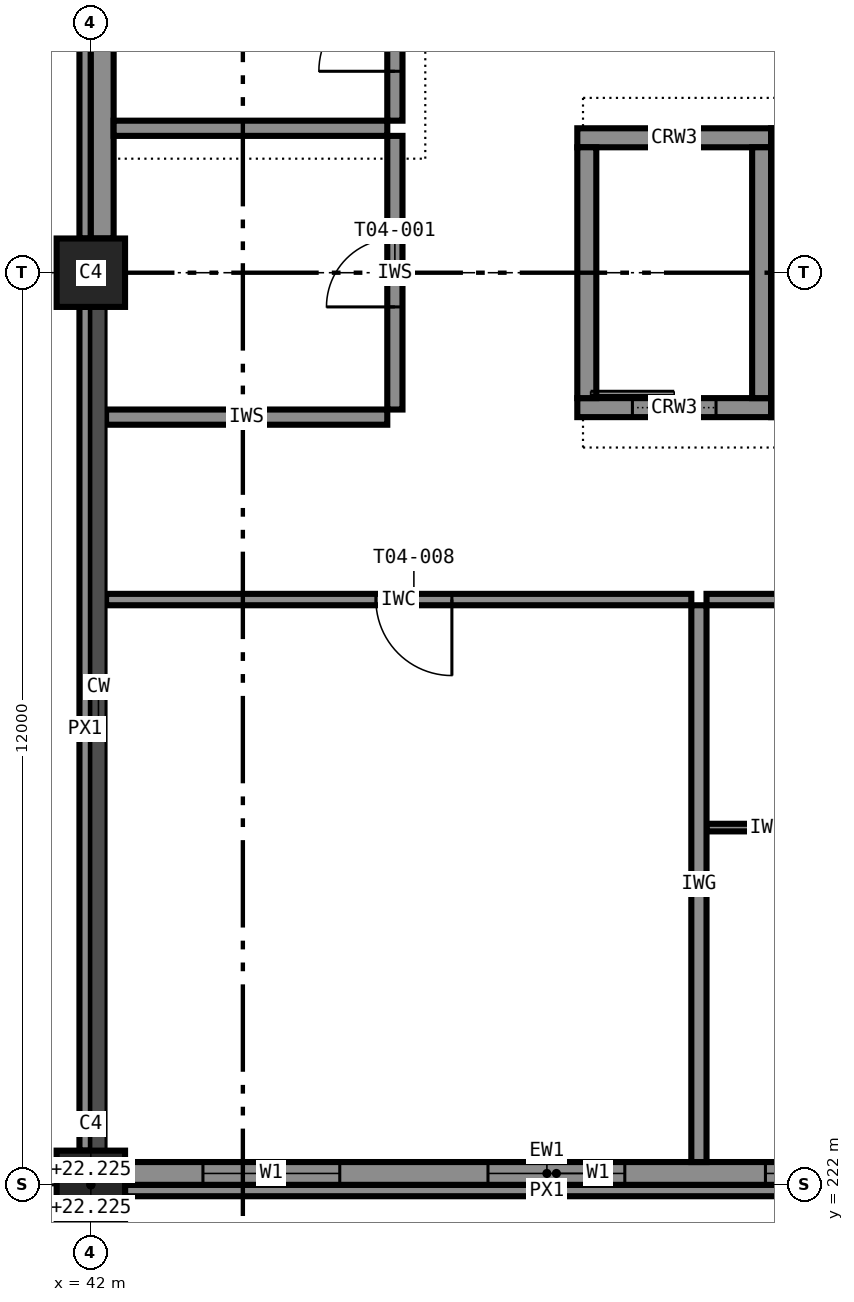
"""IFC4 building model, lengths in metres.
Left out: names, types, materials, properties, quantities, classifications, styles, units other than length and angle.
Written with IfcOpenShell. Run it as: python <this file> out.ifc"""

import sys

from ifc_helpers import new_model, si_unit, direction, frame, frame_2d, origin, origin_2d, place, context, subcontext, project, spatial, rectangle, extrude, element, fill, save


model = new_model("IFC4")
c1 = context("Model", 3, precision=1e-05, world=origin(), true_north=direction((0.0, 1.0)))
c2 = subcontext(c1, "Body", "Model", "MODEL_VIEW")
j1 = project(units=[si_unit("LENGTHUNIT", "METRE"), si_unit("PLANEANGLEUNIT", "RADIAN")], contexts=[c1])
p1 = place(None, origin())
s1 = spatial("IfcSite", under=j1, at=p1, CompositionType="ELEMENT")
p2 = place(p1, origin())
s2 = spatial("IfcBuilding", under=s1, at=p2, CompositionType="ELEMENT")
p3 = place(p2, frame((0.0, 0.0, 21.0)))
s3 = spatial("IfcBuildingStorey", under=s2, at=p3, CompositionType="ELEMENT", Elevation=21.0)
for number, where, z_axis, x_axis in (
    (1, (42.0, 222.0, 0.0), (0.0, 0.0, 1.0), (1.0, 0.0, 0.0)),
    (2, (42.0, 234.0, 0.0), (0.0, 0.0, 1.0), (1.0, 0.0, 0.0)),
):
    element("IfcColumn", number, at=place(p3, frame(where, z_axis=z_axis, x_axis=x_axis)), inside=s3, PredefinedType="COLUMN", context=c2, shape_type="SweptSolid", body=[
        extrude(rectangle(XDim=0.9, YDim=0.9, at=origin_2d()), origin(), (0.0, 0.0, 1.0), 3.6),
    ])
p4 = place(p3, frame((48.4, 232.225, 0.0), z_axis=(0.0, 0.0, 1.0), x_axis=(1.0, 0.0, 0.0)))
e3 = element("IfcWall", 3, at=p4, inside=s3, PredefinedType="SHEAR", context=c2, shape_type="SweptSolid", body=[
    extrude(rectangle(XDim=2.55, YDim=0.25, at=frame_2d((1.275, 0.0))), origin(), (0.0, 0.0, 1.0), 3.6),
])
p5 = place(p4, frame((0.725, 0.0, 0.0)))
e4 = element("IfcOpeningElement", 4, at=p5, cuts=e3, PredefinedType="OPENING", context=c2, shape_type="SweptSolid", body=[
    extrude(rectangle(XDim=1.1, YDim=2.1, at=frame_2d((0.55, 1.05))), frame((0.0, 0.135, 0.0), z_axis=(0.0, -1.0, 0.0), x_axis=(1.0, 0.0, 0.0)), (0.0, 0.0, 1.0), 0.27),
])
p6 = place(p3, frame((48.4, 235.775, 0.0), z_axis=(0.0, 0.0, 1.0), x_axis=(1.0, 0.0, 0.0)))
e5 = element("IfcWall", 5, at=p6, inside=s3, PredefinedType="SHEAR", context=c2, shape_type="SweptSolid", body=[
    extrude(rectangle(XDim=2.55, YDim=0.25, at=frame_2d((1.275, 0.0))), origin(), (0.0, 0.0, 1.0), 3.6),
])
for number, where, z_axis, x_axis in (
    (6, (48.525, 232.35, 0.0), (0.0, 0.0, 1.0), (0.0, 1.0, 0.0)),
    (7, (50.825, 232.35, 0.0), (0.0, 0.0, 1.0), (0.0, 1.0, 0.0)),
):
    element("IfcWall", number, at=place(p3, frame(where, z_axis=z_axis, x_axis=x_axis)), inside=s3, PredefinedType="SHEAR", context=c2, shape_type="SweptSolid", body=[
        extrude(rectangle(XDim=3.3, YDim=0.25, at=frame_2d((1.65, 0.0))), origin(), (0.0, 0.0, 1.0), 3.6),
    ])
p7 = place(p3, frame((50.95, 232.225, 0.0), z_axis=(0.0, 0.0, 1.0), x_axis=(1.0, 0.0, 0.0)))
e8 = element("IfcWall", 8, at=p7, inside=s3, PredefinedType="SHEAR", context=c2, shape_type="SweptSolid", body=[
    extrude(rectangle(XDim=2.55, YDim=0.25, at=frame_2d((1.275, 0.0))), origin(), (0.0, 0.0, 1.0), 3.6),
])
p8 = place(p7, frame((0.725, 0.0, 0.0)))
e9 = element("IfcOpeningElement", 9, at=p8, cuts=e8, PredefinedType="OPENING", context=c2, shape_type="SweptSolid", body=[
    extrude(rectangle(XDim=1.1, YDim=2.1, at=frame_2d((0.55, 1.05))), frame((0.0, 0.135, 0.0), z_axis=(0.0, -1.0, 0.0), x_axis=(1.0, 0.0, 0.0)), (0.0, 0.0, 1.0), 0.27),
])
p9 = place(p3, frame((50.95, 235.775, 0.0), z_axis=(0.0, 0.0, 1.0), x_axis=(1.0, 0.0, 0.0)))
e10 = element("IfcWall", 10, at=p9, inside=s3, PredefinedType="SHEAR", context=c2, shape_type="SweptSolid", body=[
    extrude(rectangle(XDim=2.55, YDim=0.25, at=frame_2d((1.275, 0.0))), origin(), (0.0, 0.0, 1.0), 3.6),
])
p10 = place(p3, frame((51.075, 232.35, 0.0), z_axis=(0.0, 0.0, 1.0), x_axis=(0.0, 1.0, 0.0)))
e11 = element("IfcWall", 11, at=p10, inside=s3, PredefinedType="SHEAR", context=c2, shape_type="SweptSolid", body=[
    extrude(rectangle(XDim=3.3, YDim=0.25, at=frame_2d((1.65, 0.0))), origin(), (0.0, 0.0, 1.0), 3.6),
])
p11 = place(p3, frame((42.45, 222.15, 0.0), z_axis=(0.0, 0.0, 1.0), x_axis=(1.0, 0.0, 0.0)))
e12 = element("IfcWall", 12, at=p11, inside=s3, PredefinedType="STANDARD", context=c2, shape_type="SweptSolid", body=[
    extrude(rectangle(XDim=11.1, YDim=0.3, at=frame_2d((5.55, 0.0))), origin(), (0.0, 0.0, 1.0), 2.6),
])
p12 = place(p11, frame((1.025, 0.0, 0.85)))
e13 = element("IfcOpeningElement", 13, at=p12, cuts=e12, PredefinedType="OPENING", context=c2, shape_type="SweptSolid", body=[
    extrude(rectangle(XDim=1.8, YDim=1.75, at=frame_2d((0.9, 0.875))), frame((0.0, 0.16, 0.0), z_axis=(0.0, -1.0, 0.0), x_axis=(1.0, 0.0, 0.0)), (0.0, 0.0, 1.0), 0.32),
])
p13 = place(p11, frame((4.775, 0.0, 0.85)))
e14 = element("IfcOpeningElement", 14, at=p13, cuts=e12, PredefinedType="OPENING", context=c2, shape_type="SweptSolid", body=[
    extrude(rectangle(XDim=1.8, YDim=1.75, at=frame_2d((0.9, 0.875))), frame((0.0, 0.16, 0.0), z_axis=(0.0, -1.0, 0.0), x_axis=(1.0, 0.0, 0.0)), (0.0, 0.0, 1.0), 0.32),
])
p14 = place(p11, frame((8.425, 0.0, 0.85)))
e15 = element("IfcOpeningElement", 15, at=p14, cuts=e12, PredefinedType="OPENING", context=c2, shape_type="SweptSolid", body=[
    extrude(rectangle(XDim=1.8, YDim=1.75, at=frame_2d((0.9, 0.875))), frame((0.0, 0.16, 0.0), z_axis=(0.0, -1.0, 0.0), x_axis=(1.0, 0.0, 0.0)), (0.0, 0.0, 1.0), 0.32),
])
p15 = place(p3, frame((42.45, 221.925, 3.4), z_axis=(0.0, 0.0, 1.0), x_axis=(1.0, 0.0, 0.0)))
e16 = element("IfcWall", 16, at=p15, inside=s3, PredefinedType="STANDARD", context=c2, shape_type="SweptSolid", body=[
    extrude(rectangle(XDim=11.1, YDim=0.15, at=frame_2d((5.55, 0.0))), origin(), (0.0, 0.0, 1.0), 0.2),
])
p16 = place(p3, frame((42.15, 245.55, 0.0), z_axis=(0.0, 0.0, 1.0), x_axis=(0.0, -1.0, 0.0)))
e17 = element("IfcWall", 17, at=p16, inside=s3, PredefinedType="STANDARD", context=c2, shape_type="SweptSolid", body=[
    extrude(rectangle(XDim=11.1, YDim=0.3, at=frame_2d((5.55, 0.0))), origin(), (0.0, 0.0, 1.0), 2.6),
])
for number, where, z_axis, x_axis in (
    (18, (41.925, 245.55, 3.4), (0.0, 0.0, 1.0), (0.0, -1.0, 0.0)),
    (19, (41.925, 233.55, 3.4), (0.0, 0.0, 1.0), (0.0, -1.0, 0.0)),
):
    element("IfcWall", number, at=place(p3, frame(where, z_axis=z_axis, x_axis=x_axis)), inside=s3, PredefinedType="STANDARD", context=c2, shape_type="SweptSolid", body=[
        extrude(rectangle(XDim=11.1, YDim=0.15, at=frame_2d((5.55, 0.0))), origin(), (0.0, 0.0, 1.0), 0.2),
    ])
p17 = place(p3, frame((42.2, 232.1, 0.0), z_axis=(0.0, 0.0, 1.0), x_axis=(1.0, 0.0, 0.0)))
e20 = element("IfcWall", 20, at=p17, inside=s3, PredefinedType="PARTITIONING", context=c2, shape_type="SweptSolid", body=[
    extrude(rectangle(XDim=3.7, YDim=0.2, at=frame_2d((1.85, 0.0))), origin(), (0.0, 0.0, 1.0), 3.4),
])
p18 = place(p3, frame((42.3, 235.9, 0.0), z_axis=(0.0, 0.0, 1.0), x_axis=(1.0, 0.0, 0.0)))
e21 = element("IfcWall", 21, at=p18, inside=s3, PredefinedType="PARTITIONING", context=c2, shape_type="SweptSolid", body=[
    extrude(rectangle(XDim=3.6, YDim=0.2, at=frame_2d((1.8, 0.0))), origin(), (0.0, 0.0, 1.0), 3.4),
])
p19 = place(p3, frame((46.0, 232.2, 0.0), z_axis=(0.0, 0.0, 1.0), x_axis=(0.0, 1.0, 0.0)))
e22 = element("IfcWall", 22, at=p19, inside=s3, PredefinedType="PARTITIONING", context=c2, shape_type="SweptSolid", body=[
    extrude(rectangle(XDim=3.6, YDim=0.2, at=frame_2d((1.8, 0.0))), origin(), (0.0, 0.0, 1.0), 3.4),
])
p20 = place(p19, frame((1.35, 0.0, 0.0)))
e23 = element("IfcOpeningElement", 23, at=p20, cuts=e22, PredefinedType="OPENING", context=c2, shape_type="SweptSolid", body=[
    extrude(rectangle(XDim=0.9, YDim=2.1, at=frame_2d((0.45, 1.05))), frame((0.0, 0.11, 0.0), z_axis=(0.0, -1.0, 0.0), x_axis=(1.0, 0.0, 0.0)), (0.0, 0.0, 1.0), 0.22),
])
p21 = place(p3, frame((46.0, 236.0, 0.0), z_axis=(0.0, 0.0, 1.0), x_axis=(0.0, 1.0, 0.0)))
e24 = element("IfcWall", 24, at=p21, inside=s3, PredefinedType="PARTITIONING", context=c2, shape_type="SweptSolid", body=[
    extrude(rectangle(XDim=2.3, YDim=0.2, at=frame_2d((1.15, 0.0))), origin(), (0.0, 0.0, 1.0), 3.4),
])
p22 = place(p21, frame((0.65, 0.0, 0.0)))
e25 = element("IfcOpeningElement", 25, at=p22, cuts=e24, PredefinedType="OPENING", context=c2, shape_type="SweptSolid", body=[
    extrude(rectangle(XDim=1.0, YDim=2.1, at=frame_2d((0.5, 1.05))), frame((0.0, 0.11, 0.0), z_axis=(0.0, -1.0, 0.0), x_axis=(1.0, 0.0, 0.0)), (0.0, 0.0, 1.0), 0.22),
])
p23 = place(p3, frame((49.9, 229.7, 0.0), z_axis=(0.0, 0.0, 1.0), x_axis=(-1.0, 0.0, 0.0)))
e26 = element("IfcWall", 26, at=p23, inside=s3, PredefinedType="PARTITIONING", context=c2, shape_type="SweptSolid", body=[
    extrude(rectangle(XDim=7.7, YDim=0.15, at=frame_2d((3.85, 0.0))), origin(), (0.0, 0.0, 1.0), 3.4),
])
p24 = place(p23, frame((3.15, 0.0, 0.0)))
e27 = element("IfcOpeningElement", 27, at=p24, cuts=e26, PredefinedType="OPENING", context=c2, shape_type="SweptSolid", body=[
    extrude(rectangle(XDim=1.0, YDim=2.1, at=frame_2d((0.5, 1.05))), frame((0.0, 0.085, 0.0), z_axis=(0.0, -1.0, 0.0), x_axis=(1.0, 0.0, 0.0)), (0.0, 0.0, 1.0), 0.17),
])
p25 = place(p3, frame((53.9, 229.7, 0.0), z_axis=(0.0, 0.0, 1.0), x_axis=(-1.0, 0.0, 0.0)))
e28 = element("IfcWall", 28, at=p25, inside=s3, PredefinedType="PARTITIONING", context=c2, shape_type="SweptSolid", body=[
    extrude(rectangle(XDim=3.8, YDim=0.15, at=frame_2d((1.9, 0.0))), origin(), (0.0, 0.0, 1.0), 3.4),
])
p26 = place(p25, frame((0.55, 0.0, 0.0)))
e29 = element("IfcOpeningElement", 29, at=p26, cuts=e28, PredefinedType="OPENING", context=c2, shape_type="SweptSolid", body=[
    extrude(rectangle(XDim=1.0, YDim=2.1, at=frame_2d((0.5, 1.05))), frame((0.0, 0.085, 0.0), z_axis=(0.0, -1.0, 0.0), x_axis=(1.0, 0.0, 0.0)), (0.0, 0.0, 1.0), 0.17),
])
p27 = place(p3, frame((50.1, 226.7, 0.0), z_axis=(0.0, 0.0, 1.0), x_axis=(1.0, 0.0, 0.0)))
e30 = element("IfcWall", 30, at=p27, inside=s3, PredefinedType="PARTITIONING", context=c2, shape_type="SweptSolid", body=[
    extrude(rectangle(XDim=1.6, YDim=0.1, at=frame_2d((0.8, 0.0))), origin(), (0.0, 0.0, 1.0), 3.4),
])
p28 = place(p3, frame((50.0, 222.3, 0.0), z_axis=(0.0, 0.0, 1.0), x_axis=(0.0, 1.0, 0.0)))
e31 = element("IfcWall", 31, at=p28, inside=s3, PredefinedType="PARTITIONING", context=c2, shape_type="SweptSolid", body=[
    extrude(rectangle(XDim=7.325, YDim=0.2, at=frame_2d((3.663, 0.0))), origin(), (0.0, 0.0, 1.0), 3.4),
])
p29 = place(p12, origin())
e32 = element("IfcWindow", 32, at=p29, inside=s3, PartitioningType="SINGLE_PANEL", PredefinedType="WINDOW", context=c2, shape_type="SweptSolid", body=[
    extrude(rectangle(XDim=1.8, YDim=1.75, at=frame_2d((0.9, 0.875))), frame((0.0, 0.03, 0.0), z_axis=(0.0, -1.0, 0.0), x_axis=(1.0, 0.0, 0.0)), (0.0, 0.0, 1.0), 0.06),
])
fill(e13, e32)
p30 = place(p13, origin())
e33 = element("IfcWindow", 33, at=p30, inside=s3, PartitioningType="SINGLE_PANEL", PredefinedType="WINDOW", context=c2, shape_type="SweptSolid", body=[
    extrude(rectangle(XDim=1.8, YDim=1.75, at=frame_2d((0.9, 0.875))), frame((0.0, 0.03, 0.0), z_axis=(0.0, -1.0, 0.0), x_axis=(1.0, 0.0, 0.0)), (0.0, 0.0, 1.0), 0.06),
])
fill(e14, e33)
p31 = place(p14, origin())
e34 = element("IfcWindow", 34, at=p31, inside=s3, PartitioningType="SINGLE_PANEL", PredefinedType="WINDOW", context=c2, shape_type="SweptSolid", body=[
    extrude(rectangle(XDim=1.8, YDim=1.75, at=frame_2d((0.9, 0.875))), frame((0.0, 0.03, 0.0), z_axis=(0.0, -1.0, 0.0), x_axis=(1.0, 0.0, 0.0)), (0.0, 0.0, 1.0), 0.06),
])
fill(e15, e34)
p32 = place(p20, origin())
e35 = element("IfcDoor", 35, at=p32, inside=s3, OperationType="SINGLE_SWING_LEFT", PredefinedType="DOOR", context=c2, shape_type="SweptSolid", body=[
    extrude(rectangle(XDim=0.9, YDim=2.1, at=frame_2d((0.45, 1.05))), frame((0.0, 0.025, 0.0), z_axis=(0.0, -1.0, 0.0), x_axis=(1.0, 0.0, 0.0)), (0.0, 0.0, 1.0), 0.05),
])
fill(e23, e35)
p33 = place(p22, origin())
e36 = element("IfcDoor", 36, at=p33, inside=s3, OperationType="SINGLE_SWING_LEFT", PredefinedType="DOOR", context=c2, shape_type="SweptSolid", body=[
    extrude(rectangle(XDim=1.0, YDim=2.1, at=frame_2d((0.5, 1.05))), frame((0.0, 0.025, 0.0), z_axis=(0.0, -1.0, 0.0), x_axis=(1.0, 0.0, 0.0)), (0.0, 0.0, 1.0), 0.05),
])
fill(e25, e36)
p34 = place(p24, origin())
e37 = element("IfcDoor", 37, at=p34, inside=s3, OperationType="SINGLE_SWING_LEFT", PredefinedType="DOOR", context=c2, shape_type="SweptSolid", body=[
    extrude(rectangle(XDim=1.0, YDim=2.1, at=frame_2d((0.5, 1.05))), frame((0.0, 0.025, 0.0), z_axis=(0.0, -1.0, 0.0), x_axis=(1.0, 0.0, 0.0)), (0.0, 0.0, 1.0), 0.05),
])
fill(e27, e37)
p35 = place(p5, origin())
e38 = element("IfcDoor", 38, at=p35, inside=s3, OperationType="SLIDING_TO_LEFT", PredefinedType="DOOR", context=c2, shape_type="SweptSolid", body=[
    extrude(rectangle(XDim=1.1, YDim=2.1, at=frame_2d((0.55, 1.05))), frame((0.0, 0.025, 0.0), z_axis=(0.0, -1.0, 0.0), x_axis=(1.0, 0.0, 0.0)), (0.0, 0.0, 1.0), 0.05),
])
fill(e4, e38)
save(model, sys.argv[1])
